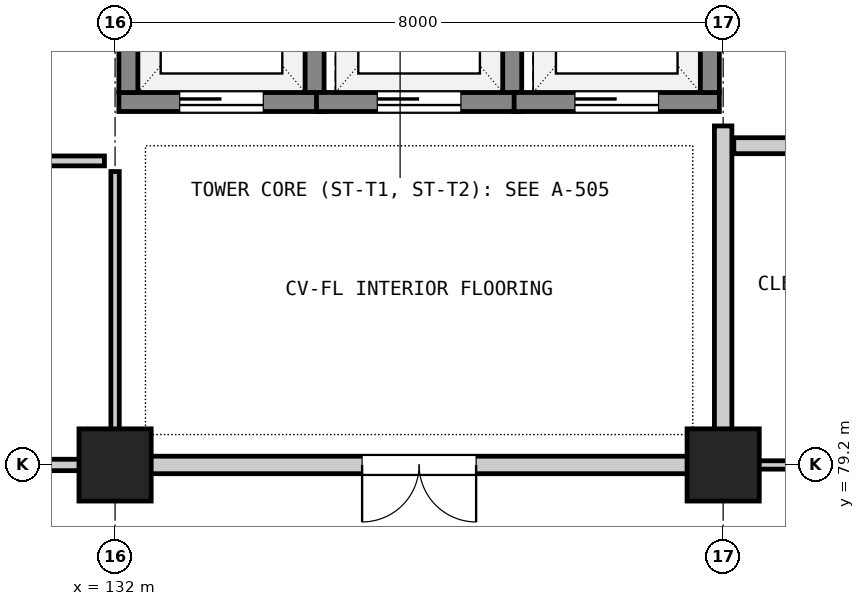
"""IFC4 building model, lengths in metres.
Left out: names, types, materials, properties, quantities, classifications, styles, units other than length and angle.
Written with IfcOpenShell. Run it as: python <this file> out.ifc"""

import sys

from ifc_helpers import new_model, si_unit, direction, frame, frame_2d, origin, origin_2d, place, context, subcontext, project, spatial, rectangle, extrude, element, fill, save


model = new_model("IFC4")
c1 = context("Model", 3, precision=1e-05, world=origin(), true_north=direction((0.0, 1.0)))
c2 = subcontext(c1, "Body", "Model", "MODEL_VIEW")
j1 = project(units=[si_unit("LENGTHUNIT", "METRE"), si_unit("PLANEANGLEUNIT", "RADIAN")], contexts=[c1])
p1 = place(None, origin())
s1 = spatial("IfcSite", under=j1, at=p1, CompositionType="ELEMENT")
p2 = place(p1, origin())
s2 = spatial("IfcBuilding", under=s1, at=p2, CompositionType="ELEMENT")
p3 = place(p2, frame((0.0, 0.0, 10.8)))
s3 = spatial("IfcBuildingStorey", under=s2, at=p3, CompositionType="ELEMENT", Elevation=10.8)
for number, where, z_axis, x_axis in (
    (1, (132.0, 79.2, 0.0), (0.0, 0.0, 1.0), (1.0, 0.0, 0.0)),
    (2, (140.0, 79.2, 0.0), (0.0, 0.0, 1.0), (1.0, 0.0, 0.0)),
):
    element("IfcColumn", number, at=place(p3, frame(where, z_axis=z_axis, x_axis=x_axis)), inside=s3, PredefinedType="COLUMN", context=c2, shape_type="SweptSolid", body=[
        extrude(rectangle(XDim=0.95, YDim=0.95, at=origin_2d()), origin(), (0.0, 0.0, 1.0), 4.8),
    ])
p4 = place(p3, frame((132.05, 83.975, 0.0), z_axis=(0.0, 0.0, 1.0), x_axis=(1.0, 0.0, 0.0)))
e3 = element("IfcWall", 3, at=p4, inside=s3, PredefinedType="SHEAR", context=c2, shape_type="SweptSolid", body=[
    extrude(rectangle(XDim=2.7, YDim=0.25, at=frame_2d((1.35, 0.0))), origin(), (0.0, 0.0, 1.0), 4.5),
])
p5 = place(p4, frame((0.8, 0.0, 0.0)))
e4 = element("IfcOpeningElement", 4, at=p5, cuts=e3, PredefinedType="OPENING", context=c2, shape_type="SweptSolid", body=[
    extrude(rectangle(XDim=1.1, YDim=2.15, at=frame_2d((0.55, 1.075))), frame((0.0, 0.137, 0.0), z_axis=(0.0, -1.0, 0.0), x_axis=(1.0, 0.0, 0.0)), (0.0, 0.0, 1.0), 0.274),
])
for number, where, z_axis, x_axis in (
    (5, (132.175, 84.1, 0.0), (0.0, 0.0, 1.0), (0.0, 1.0, 0.0)),
    (6, (134.625, 84.1, 0.0), (0.0, 0.0, 1.0), (0.0, 1.0, 0.0)),
):
    element("IfcWall", number, at=place(p3, frame(where, z_axis=z_axis, x_axis=x_axis)), inside=s3, PredefinedType="SHEAR", context=c2, shape_type="SweptSolid", body=[
        extrude(rectangle(XDim=2.6, YDim=0.25, at=frame_2d((1.3, 0.0))), origin(), (0.0, 0.0, 1.0), 4.5),
    ])
p6 = place(p3, frame((134.65, 83.975, 0.0), z_axis=(0.0, 0.0, 1.0), x_axis=(1.0, 0.0, 0.0)))
e7 = element("IfcWall", 7, at=p6, inside=s3, PredefinedType="SHEAR", context=c2, shape_type="SweptSolid", body=[
    extrude(rectangle(XDim=2.7, YDim=0.25, at=frame_2d((1.35, 0.0))), origin(), (0.0, 0.0, 1.0), 4.5),
])
p7 = place(p6, frame((0.8, 0.0, 0.0)))
e8 = element("IfcOpeningElement", 8, at=p7, cuts=e7, PredefinedType="OPENING", context=c2, shape_type="SweptSolid", body=[
    extrude(rectangle(XDim=1.1, YDim=2.15, at=frame_2d((0.55, 1.075))), frame((0.0, 0.137, 0.0), z_axis=(0.0, -1.0, 0.0), x_axis=(1.0, 0.0, 0.0)), (0.0, 0.0, 1.0), 0.274),
])
p8 = place(p3, frame((137.225, 84.1, 0.0), z_axis=(0.0, 0.0, 1.0), x_axis=(0.0, 1.0, 0.0)))
e9 = element("IfcWall", 9, at=p8, inside=s3, PredefinedType="SHEAR", context=c2, shape_type="SweptSolid", body=[
    extrude(rectangle(XDim=2.6, YDim=0.25, at=frame_2d((1.3, 0.0))), origin(), (0.0, 0.0, 1.0), 4.5),
])
p9 = place(p3, frame((137.25, 83.975, 0.0), z_axis=(0.0, 0.0, 1.0), x_axis=(1.0, 0.0, 0.0)))
e10 = element("IfcWall", 10, at=p9, inside=s3, PredefinedType="SHEAR", context=c2, shape_type="SweptSolid", body=[
    extrude(rectangle(XDim=2.7, YDim=0.25, at=frame_2d((1.35, 0.0))), origin(), (0.0, 0.0, 1.0), 4.5),
])
p10 = place(p9, frame((0.8, 0.0, 0.0)))
e11 = element("IfcOpeningElement", 11, at=p10, cuts=e10, PredefinedType="OPENING", context=c2, shape_type="SweptSolid", body=[
    extrude(rectangle(XDim=1.1, YDim=2.15, at=frame_2d((0.55, 1.075))), frame((0.0, 0.137, 0.0), z_axis=(0.0, -1.0, 0.0), x_axis=(1.0, 0.0, 0.0)), (0.0, 0.0, 1.0), 0.274),
])
p11 = place(p3, frame((139.825, 84.1, 0.0), z_axis=(0.0, 0.0, 1.0), x_axis=(0.0, 1.0, 0.0)))
e12 = element("IfcWall", 12, at=p11, inside=s3, PredefinedType="SHEAR", context=c2, shape_type="SweptSolid", body=[
    extrude(rectangle(XDim=2.6, YDim=0.25, at=frame_2d((1.3, 0.0))), origin(), (0.0, 0.0, 1.0), 4.5),
])
p12 = place(p3, frame((128.34, 79.2, 0.0), z_axis=(0.0, 0.0, 1.0), x_axis=(1.0, 0.0, 0.0)))
e13 = element("IfcWall", 13, at=p12, inside=s3, PredefinedType="PARTITIONING", context=c2, shape_type="SweptSolid", body=[
    extrude(rectangle(XDim=3.52, YDim=0.15, at=frame_2d((1.76, 0.0))), origin(), (0.0, 0.0, 1.0), 3.945),
])
p13 = place(p12, frame((1.235, 0.0, 0.0)))
e14 = element("IfcOpeningElement", 14, at=p13, cuts=e13, PredefinedType="OPENING", context=c2, shape_type="SweptSolid", body=[
    extrude(rectangle(XDim=1.05, YDim=2.15, at=frame_2d((0.525, 1.075))), frame((0.0, 0.087, 0.0), z_axis=(0.0, -1.0, 0.0), x_axis=(1.0, 0.0, 0.0)), (0.0, 0.0, 1.0), 0.174),
])
p14 = place(p3, frame((128.34, 83.2, 0.0), z_axis=(0.0, 0.0, 1.0), x_axis=(1.0, 0.0, 0.0)))
e15 = element("IfcWall", 15, at=p14, inside=s3, PredefinedType="PARTITIONING", context=c2, shape_type="SweptSolid", body=[
    extrude(rectangle(XDim=3.52, YDim=0.13, at=frame_2d((1.76, 0.0))), origin(), (0.0, 0.0, 1.0), 4.5),
])
p15 = place(p3, frame((132.0, 79.34, 0.0), z_axis=(0.0, 0.0, 1.0), x_axis=(0.0, 1.0, 0.0)))
e16 = element("IfcWall", 16, at=p15, inside=s3, PredefinedType="PARTITIONING", context=c2, shape_type="SweptSolid", body=[
    extrude(rectangle(XDim=3.72, YDim=0.11, at=frame_2d((1.86, 0.0))), origin(), (0.0, 0.0, 1.0), 3.995),
])
p16 = place(p3, frame((132.14, 79.2, 0.0), z_axis=(0.0, 0.0, 1.0), x_axis=(1.0, 0.0, 0.0)))
e17 = element("IfcWall", 17, at=p16, inside=s3, PredefinedType="SOLIDWALL", context=c2, shape_type="SweptSolid", body=[
    extrude(rectangle(XDim=7.72, YDim=0.23, at=frame_2d((3.86, 0.0))), origin(), (0.0, 0.0, 1.0), 3.995),
])
p17 = place(p16, frame((3.11, 0.0, 0.0)))
e18 = element("IfcOpeningElement", 18, at=p17, cuts=e17, PredefinedType="OPENING", context=c2, shape_type="SweptSolid", body=[
    extrude(rectangle(XDim=1.5, YDim=2.2, at=frame_2d((0.75, 1.1))), frame((0.0, 0.127, 0.0), z_axis=(0.0, -1.0, 0.0), x_axis=(1.0, 0.0, 0.0)), (0.0, 0.0, 1.0), 0.254),
])
p18 = place(p3, frame((140.0, 79.34, 0.0), z_axis=(0.0, 0.0, 1.0), x_axis=(0.0, 1.0, 0.0)))
e19 = element("IfcWall", 19, at=p18, inside=s3, PredefinedType="SOLIDWALL", context=c2, shape_type="SweptSolid", body=[
    extrude(rectangle(XDim=4.32, YDim=0.23, at=frame_2d((2.16, 0.0))), origin(), (0.0, 0.0, 1.0), 3.895),
])
p19 = place(p3, frame((140.14, 83.4, 0.0), z_axis=(0.0, 0.0, 1.0), x_axis=(1.0, 0.0, 0.0)))
e20 = element("IfcWall", 20, at=p19, inside=s3, PredefinedType="SOLIDWALL", context=c2, shape_type="SweptSolid", body=[
    extrude(rectangle(XDim=7.72, YDim=0.21, at=frame_2d((3.86, 0.0))), origin(), (0.0, 0.0, 1.0), 4.5),
])
p20 = place(p3, frame((140.14, 79.2, 0.0), z_axis=(0.0, 0.0, 1.0), x_axis=(1.0, 0.0, 0.0)))
e21 = element("IfcWall", 21, at=p20, inside=s3, PredefinedType="PARTITIONING", context=c2, shape_type="SweptSolid", body=[
    extrude(rectangle(XDim=7.72, YDim=0.11, at=frame_2d((3.86, 0.0))), origin(), (0.0, 0.0, 1.0), 3.995),
])
p21 = place(p20, frame((3.36, 0.0, 0.0)))
e22 = element("IfcOpeningElement", 22, at=p21, cuts=e21, PredefinedType="OPENING", context=c2, shape_type="SweptSolid", body=[
    extrude(rectangle(XDim=1.0, YDim=2.15, at=frame_2d((0.5, 1.075))), frame((0.0, 0.067, 0.0), z_axis=(0.0, -1.0, 0.0), x_axis=(1.0, 0.0, 0.0)), (0.0, 0.0, 1.0), 0.134),
])
p22 = place(p5, origin())
e23 = element("IfcDoor", 23, at=p22, inside=s3, OperationType="SLIDING_TO_LEFT", PredefinedType="DOOR", context=c2, shape_type="SweptSolid", body=[
    extrude(rectangle(XDim=1.1, YDim=2.15, at=frame_2d((0.55, 1.075))), frame((0.0, 0.025, 0.0), z_axis=(0.0, -1.0, 0.0), x_axis=(1.0, 0.0, 0.0)), (0.0, 0.0, 1.0), 0.05),
])
fill(e4, e23)
p23 = place(p7, origin())
e24 = element("IfcDoor", 24, at=p23, inside=s3, OperationType="SLIDING_TO_LEFT", PredefinedType="DOOR", context=c2, shape_type="SweptSolid", body=[
    extrude(rectangle(XDim=1.1, YDim=2.15, at=frame_2d((0.55, 1.075))), frame((0.0, 0.025, 0.0), z_axis=(0.0, -1.0, 0.0), x_axis=(1.0, 0.0, 0.0)), (0.0, 0.0, 1.0), 0.05),
])
fill(e8, e24)
p24 = place(p10, origin())
e25 = element("IfcDoor", 25, at=p24, inside=s3, OperationType="SLIDING_TO_LEFT", PredefinedType="DOOR", context=c2, shape_type="SweptSolid", body=[
    extrude(rectangle(XDim=1.1, YDim=2.15, at=frame_2d((0.55, 1.075))), frame((0.0, 0.025, 0.0), z_axis=(0.0, -1.0, 0.0), x_axis=(1.0, 0.0, 0.0)), (0.0, 0.0, 1.0), 0.05),
])
fill(e11, e25)
p25 = place(p17, frame((1.5, 0.0, 0.0), z_axis=(0.0, 0.0, 1.0), x_axis=(-1.0, 0.0, 0.0)))
e26 = element("IfcDoor", 26, at=p25, inside=s3, OperationType="DOUBLE_DOOR_SINGLE_SWING", PredefinedType="DOOR", context=c2, shape_type="SweptSolid", body=[
    extrude(rectangle(XDim=1.5, YDim=2.2, at=frame_2d((0.75, 1.1))), frame((0.0, 0.025, 0.0), z_axis=(0.0, -1.0, 0.0), x_axis=(1.0, 0.0, 0.0)), (0.0, 0.0, 1.0), 0.05),
])
fill(e18, e26)
save(model, sys.argv[1])
